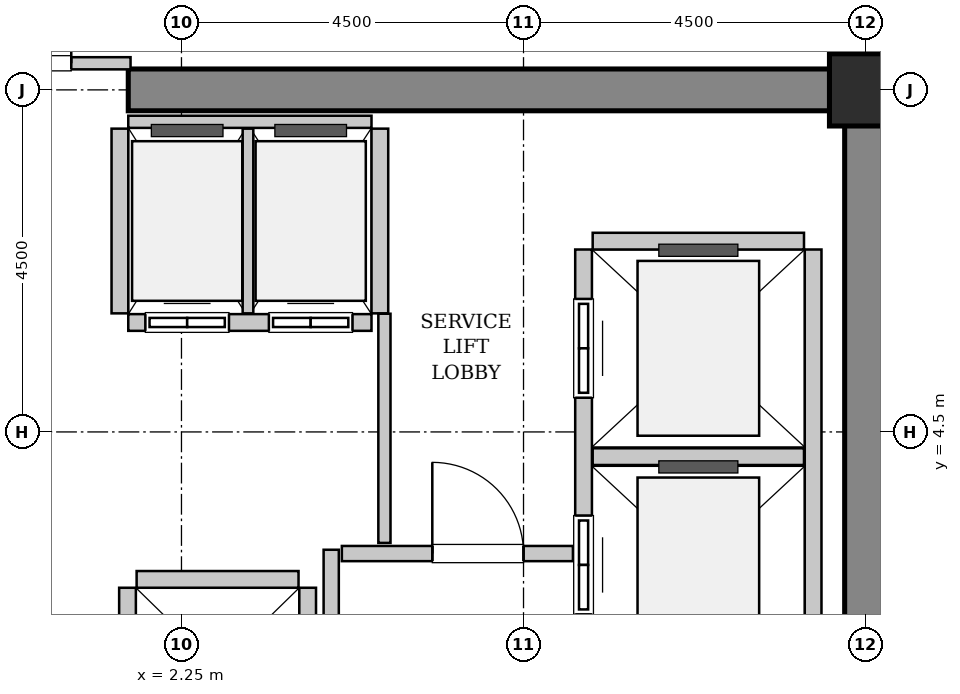
"""IFC4 building model, lengths in metres.
Left out: names, types, materials, properties, quantities, classifications, styles, units other than length and angle.
Written with IfcOpenShell. Run it as: python <this file> out.ifc"""

import sys

from ifc_helpers import new_model, si_unit, direction, frame, frame_2d, origin, origin_2d, place, context, subcontext, project, spatial, rectangle, hollow_rectangle, extrude, source, transform, mapped, element, fill, save


model = new_model("IFC4")
c1 = context("Model", 3, precision=1e-05, world=origin(), true_north=direction((0.0, 1.0)))
c2 = subcontext(c1, "Body", "Model", "MODEL_VIEW")
j1 = project(units=[si_unit("LENGTHUNIT", "METRE"), si_unit("PLANEANGLEUNIT", "RADIAN")], contexts=[c1])
p1 = place(None, origin())
s1 = spatial("IfcSite", under=j1, at=p1, CompositionType="ELEMENT")
p2 = place(p1, origin())
s2 = spatial("IfcBuilding", under=s1, at=p2, CompositionType="ELEMENT")
p3 = place(p2, frame((0.0, 0.0, 94.6)))
s3 = spatial("IfcBuildingStorey", under=s2, at=p3, CompositionType="ELEMENT", Elevation=94.6)
m1 = source(origin(), c2, "Body", "SweptSolid", [
    extrude(rectangle(XDim=9.975, YDim=0.55, at=frame_2d((4.987, 0.0))), origin(), (0.0, 0.0, 1.0), 3.8),
])
p4 = place(p3, frame((1.55, 9.0, 0.0), z_axis=(0.0, 0.0, 1.0), x_axis=(1.0, 0.0, 0.0)))
e1 = element("IfcWall", 1, at=p4, inside=s3, PredefinedType="SHEAR", context=c2, shape_type="MappedRepresentation", body=[
    mapped(m1, transform((0.0, 0.0, 0.0), x_axis=(1.0, 0.0, 0.0), y_axis=(0.0, 1.0, 0.0), z_axis=(0.0, 0.0, 1.0), scale=1.0)),
])
m2 = source(origin(), c2, "Body", "SweptSolid", [
    extrude(rectangle(XDim=7.375, YDim=0.55, at=frame_2d((3.688, 0.0))), origin(), (0.0, 0.0, 1.0), 3.8),
])
p5 = place(p3, frame((11.25, 1.35, 0.0), z_axis=(0.0, 0.0, 1.0), x_axis=(0.0, 1.0, 0.0)))
e2 = element("IfcWall", 2, at=p5, inside=s3, PredefinedType="SHEAR", context=c2, shape_type="MappedRepresentation", body=[
    mapped(m2, transform((0.0, 0.0, 0.0), x_axis=(1.0, 0.0, 0.0), y_axis=(0.0, 1.0, 0.0), z_axis=(0.0, 0.0, 1.0), scale=1.0)),
])
m3 = source(origin(), c2, "Body", "SweptSolid", [
    extrude(hollow_rectangle(XDim=0.95, YDim=0.95, WallThickness=0.045, InnerFilletRadius=0.045, OuterFilletRadius=0.09, at=origin_2d()), origin(), (0.0, 0.0, 1.0), 3.8),
])
p6 = place(p3, frame((11.25, 9.0, 0.0), z_axis=(0.0, 0.0, 1.0), x_axis=(1.0, 0.0, 0.0)))
e3 = element("IfcColumn", 3, at=p6, inside=s3, PredefinedType="COLUMN", context=c2, shape_type="MappedRepresentation", body=[
    mapped(m3, transform((0.0, 0.0, 0.0), x_axis=(1.0, 0.0, 0.0), y_axis=(0.0, 1.0, 0.0), z_axis=(0.0, 0.0, 1.0), scale=1.0)),
])
m4 = source(origin(), c2, "Body", "SweptSolid", [
    extrude(rectangle(XDim=5.45, YDim=0.22, at=frame_2d((2.725, 0.0))), origin(), (0.0, 0.0, 1.0), 3.535),
])
p7 = place(p3, frame((7.54, 6.9, 0.0), z_axis=(0.0, 0.0, 1.0), x_axis=(0.0, -1.0, 0.0)))
e4 = element("IfcWall", 4, at=p7, inside=s3, PredefinedType="SOLIDWALL", context=c2, shape_type="MappedRepresentation", body=[
    mapped(m4, transform((0.0, 0.0, 0.0), x_axis=(1.0, 0.0, 0.0), y_axis=(0.0, 1.0, 0.0), z_axis=(0.0, 0.0, 1.0), scale=1.0)),
])
p8 = place(p7, frame((3.5, 0.0, 0.0)))
e5 = element("IfcOpeningElement", 5, at=p8, cuts=e4, PredefinedType="OPENING", context=c2, shape_type="SweptSolid", body=[
    extrude(rectangle(XDim=1.3, YDim=2.3, at=frame_2d((0.65, 1.15))), frame((0.0, 0.12, 0.0), z_axis=(0.0, -1.0, 0.0), x_axis=(1.0, 0.0, 0.0)), (0.0, 0.0, 1.0), 0.24),
])
p9 = place(p7, frame((0.65, 0.0, 0.0)))
e6 = element("IfcOpeningElement", 6, at=p9, cuts=e4, PredefinedType="OPENING", context=c2, shape_type="SweptSolid", body=[
    extrude(rectangle(XDim=1.3, YDim=2.3, at=frame_2d((0.65, 1.15))), frame((0.0, 0.12, 0.0), z_axis=(0.0, -1.0, 0.0), x_axis=(1.0, 0.0, 0.0)), (0.0, 0.0, 1.0), 0.24),
])
p10 = place(p3, frame((10.56, 1.45, 0.0), z_axis=(0.0, 0.0, 1.0), x_axis=(0.0, 1.0, 0.0)))
e7 = element("IfcWall", 7, at=p10, inside=s3, PredefinedType="SOLIDWALL", context=c2, shape_type="MappedRepresentation", body=[
    mapped(m4, transform((0.0, 0.0, 0.0), x_axis=(1.0, 0.0, 0.0), y_axis=(0.0, 1.0, 0.0), z_axis=(0.0, 0.0, 1.0), scale=1.0)),
])
m5 = source(origin(), c2, "Body", "SweptSolid", [
    extrude(rectangle(XDim=2.78, YDim=0.22, at=frame_2d((1.39, 0.0))), origin(), (0.0, 0.0, 1.0), 3.535),
])
for number, where, z_axis, x_axis in (
    (8, (7.66, 4.175, 0.0), (0.0, 0.0, 1.0), (1.0, 0.0, 0.0)),
    (9, (10.44, 7.01, 0.0), (0.0, 0.0, 1.0), (-1.0, 0.0, 0.0)),
):
    element("IfcWall", number, at=place(p3, frame(where, z_axis=z_axis, x_axis=x_axis)), inside=s3, PredefinedType="SOLIDWALL", context=c2, shape_type="MappedRepresentation", body=[
        mapped(m5, transform((0.0, 0.0, 0.0), x_axis=(1.0, 0.0, 0.0), y_axis=(0.0, 1.0, 0.0), z_axis=(0.0, 0.0, 1.0), scale=1.0)),
    ])
m6 = source(origin(), c2, "Body", "SweptSolid", [
    extrude(rectangle(XDim=3.2, YDim=0.22, at=frame_2d((1.6, 0.0))), origin(), (0.0, 0.0, 1.0), 3.535),
])
p11 = place(p3, frame((1.55, 5.94, 0.0), z_axis=(0.0, 0.0, 1.0), x_axis=(1.0, 0.0, 0.0)))
e10 = element("IfcWall", 10, at=p11, inside=s3, PredefinedType="SOLIDWALL", context=c2, shape_type="MappedRepresentation", body=[
    mapped(m6, transform((0.0, 0.0, 0.0), x_axis=(1.0, 0.0, 0.0), y_axis=(0.0, 1.0, 0.0), z_axis=(0.0, 0.0, 1.0), scale=1.0)),
])
p12 = place(p11, frame((0.225, 0.0, 0.0)))
e11 = element("IfcOpeningElement", 11, at=p12, cuts=e10, PredefinedType="OPENING", context=c2, shape_type="SweptSolid", body=[
    extrude(rectangle(XDim=1.1, YDim=2.2, at=frame_2d((0.55, 1.1))), frame((0.0, 0.12, 0.0), z_axis=(0.0, -1.0, 0.0), x_axis=(1.0, 0.0, 0.0)), (0.0, 0.0, 1.0), 0.24),
])
p13 = place(p11, frame((1.85, 0.0, 0.0)))
e12 = element("IfcOpeningElement", 12, at=p13, cuts=e10, PredefinedType="OPENING", context=c2, shape_type="SweptSolid", body=[
    extrude(rectangle(XDim=1.1, YDim=2.2, at=frame_2d((0.55, 1.1))), frame((0.0, 0.12, 0.0), z_axis=(0.0, -1.0, 0.0), x_axis=(1.0, 0.0, 0.0)), (0.0, 0.0, 1.0), 0.24),
])
m7 = source(origin(), c2, "Body", "SweptSolid", [
    extrude(rectangle(XDim=3.2, YDim=0.16, at=frame_2d((1.6, 0.0))), origin(), (0.0, 0.0, 1.0), 2.425),
])
p14 = place(p3, frame((4.75, 8.58, 0.0), z_axis=(0.0, 0.0, 1.0), x_axis=(-1.0, 0.0, 0.0)))
e13 = element("IfcWall", 13, at=p14, inside=s3, PredefinedType="PARTITIONING", context=c2, shape_type="MappedRepresentation", body=[
    mapped(m7, transform((0.0, 0.0, 0.0), x_axis=(1.0, 0.0, 0.0), y_axis=(0.0, 1.0, 0.0), z_axis=(0.0, 0.0, 1.0), scale=1.0)),
])
m8 = source(origin(), c2, "Body", "SweptSolid", [
    extrude(rectangle(XDim=2.43, YDim=0.22, at=frame_2d((1.215, 0.0))), origin(), (0.0, 0.0, 1.0), 3.535),
])
p15 = place(p3, frame((1.44, 8.49, 0.0), z_axis=(0.0, 0.0, 1.0), x_axis=(0.0, -1.0, 0.0)))
e14 = element("IfcWall", 14, at=p15, inside=s3, PredefinedType="SOLIDWALL", context=c2, shape_type="MappedRepresentation", body=[
    mapped(m8, transform((0.0, 0.0, 0.0), x_axis=(1.0, 0.0, 0.0), y_axis=(0.0, 1.0, 0.0), z_axis=(0.0, 0.0, 1.0), scale=1.0)),
])
m9 = source(origin(), c2, "Body", "SweptSolid", [
    extrude(rectangle(XDim=2.43, YDim=0.14, at=frame_2d((1.215, 0.0))), origin(), (0.0, 0.0, 1.0), 3.535),
])
p16 = place(p3, frame((3.125, 6.06, 0.0), z_axis=(0.0, 0.0, 1.0), x_axis=(0.0, 1.0, 0.0)))
e15 = element("IfcWall", 15, at=p16, inside=s3, PredefinedType="PARTITIONING", context=c2, shape_type="MappedRepresentation", body=[
    mapped(m9, transform((0.0, 0.0, 0.0), x_axis=(1.0, 0.0, 0.0), y_axis=(0.0, 1.0, 0.0), z_axis=(0.0, 0.0, 1.0), scale=1.0)),
])
p17 = place(p3, frame((4.86, 6.06, 0.0), z_axis=(0.0, 0.0, 1.0), x_axis=(0.0, 1.0, 0.0)))
e16 = element("IfcWall", 16, at=p17, inside=s3, PredefinedType="SOLIDWALL", context=c2, shape_type="MappedRepresentation", body=[
    mapped(m8, transform((0.0, 0.0, 0.0), x_axis=(1.0, 0.0, 0.0), y_axis=(0.0, 1.0, 0.0), z_axis=(0.0, 0.0, 1.0), scale=1.0)),
])
m10 = source(origin(), c2, "Body", "SweptSolid", [
    extrude(rectangle(XDim=4.9, YDim=0.22, at=frame_2d((2.45, 0.0))), origin(), (0.0, 0.0, 1.0), 3.535),
])
for number, where, z_axis, x_axis in (
    (17, (1.54, 2.45, 0.0), (0.0, 0.0, 1.0), (0.0, -1.0, 0.0)),
    (18, (3.91, -2.45, 0.0), (0.0, 0.0, 1.0), (0.0, 1.0, 0.0)),
):
    element("IfcWall", number, at=place(p3, frame(where, z_axis=z_axis, x_axis=x_axis)), inside=s3, PredefinedType="SOLIDWALL", context=c2, shape_type="MappedRepresentation", body=[
        mapped(m10, transform((0.0, 0.0, 0.0), x_axis=(1.0, 0.0, 0.0), y_axis=(0.0, 1.0, 0.0), z_axis=(0.0, 0.0, 1.0), scale=1.0)),
    ])
m11 = source(origin(), c2, "Body", "SweptSolid", [
    extrude(rectangle(XDim=2.13, YDim=0.22, at=frame_2d((1.065, 0.0))), origin(), (0.0, 0.0, 1.0), 3.535),
])
p18 = place(p3, frame((3.79, 2.56, 0.0), z_axis=(0.0, 0.0, 1.0), x_axis=(-1.0, 0.0, 0.0)))
e19 = element("IfcWall", 19, at=p18, inside=s3, PredefinedType="SOLIDWALL", context=c2, shape_type="MappedRepresentation", body=[
    mapped(m11, transform((0.0, 0.0, 0.0), x_axis=(1.0, 0.0, 0.0), y_axis=(0.0, 1.0, 0.0), z_axis=(0.0, 0.0, 1.0), scale=1.0)),
])
m12 = source(origin(), c2, "Body", "SweptSolid", [
    extrude(rectangle(XDim=5.9, YDim=0.2, at=frame_2d((2.95, 0.0))), origin(), (0.0, 0.0, 1.0), 3.535),
])
p19 = place(p3, frame((4.22, -2.95, 0.0), z_axis=(0.0, 0.0, 1.0), x_axis=(0.0, 1.0, 0.0)))
e20 = element("IfcWall", 20, at=p19, inside=s3, PredefinedType="PARTITIONING", context=c2, shape_type="MappedRepresentation", body=[
    mapped(m12, transform((0.0, 0.0, 0.0), x_axis=(1.0, 0.0, 0.0), y_axis=(0.0, 1.0, 0.0), z_axis=(0.0, 0.0, 1.0), scale=1.0)),
])
m13 = source(origin(), c2, "Body", "SweptSolid", [
    extrude(rectangle(XDim=3.04, YDim=0.2, at=frame_2d((1.52, 0.0))), origin(), (0.0, 0.0, 1.0), 3.535),
])
p20 = place(p3, frame((4.36, 2.9, 0.0), z_axis=(0.0, 0.0, 1.0), x_axis=(1.0, 0.0, 0.0)))
e21 = element("IfcWall", 21, at=p20, inside=s3, PredefinedType="PARTITIONING", context=c2, shape_type="MappedRepresentation", body=[
    mapped(m13, transform((0.0, 0.0, 0.0), x_axis=(1.0, 0.0, 0.0), y_axis=(0.0, 1.0, 0.0), z_axis=(0.0, 0.0, 1.0), scale=1.0)),
])
p21 = place(p20, frame((1.19, 0.0, 0.0)))
e22 = element("IfcOpeningElement", 22, at=p21, cuts=e21, PredefinedType="OPENING", context=c2, shape_type="SweptSolid", body=[
    extrude(rectangle(XDim=1.2, YDim=2.15, at=frame_2d((0.6, 1.075))), frame((0.0, 0.11, 0.0), z_axis=(0.0, -1.0, 0.0), x_axis=(1.0, 0.0, 0.0)), (0.0, 0.0, 1.0), 0.22),
])
m14 = source(origin(), c2, "Body", "SweptSolid", [
    extrude(rectangle(XDim=3.16, YDim=0.16, at=frame_2d((1.58, 0.0))), origin(), (0.0, 0.0, 1.0), 2.425),
])
p22 = place(p3, frame((-1.58, 9.35, 0.0), z_axis=(0.0, 0.0, 1.0), x_axis=(1.0, 0.0, 0.0)))
e23 = element("IfcWall", 23, at=p22, inside=s3, PredefinedType="PARTITIONING", context=c2, shape_type="MappedRepresentation", body=[
    mapped(m14, transform((0.0, 0.0, 0.0), x_axis=(1.0, 0.0, 0.0), y_axis=(0.0, 1.0, 0.0), z_axis=(0.0, 0.0, 1.0), scale=1.0)),
])
p23 = place(p22, frame((0.78, 0.0, 0.0)))
e24 = element("IfcOpeningElement", 24, at=p23, cuts=e23, PredefinedType="OPENING", context=c2, shape_type="SweptSolid", body=[
    extrude(rectangle(XDim=1.6, YDim=2.3, at=frame_2d((0.8, 1.15))), frame((0.0, 0.09, 0.0), z_axis=(0.0, -1.0, 0.0), x_axis=(1.0, 0.0, 0.0)), (0.0, 0.0, 1.0), 0.18),
])
m15 = source(origin(), c2, "Body", "SweptSolid", [
    extrude(rectangle(XDim=3.015, YDim=0.16, at=frame_2d((1.507, 0.0))), origin(), (0.0, 0.0, 1.0), 3.535),
])
p24 = place(p3, frame((4.92, 3.04, 0.0), z_axis=(0.0, 0.0, 1.0), x_axis=(0.0, 1.0, 0.0)))
e25 = element("IfcWall", 25, at=p24, inside=s3, PredefinedType="PARTITIONING", context=c2, shape_type="MappedRepresentation", body=[
    mapped(m15, transform((0.0, 0.0, 0.0), x_axis=(1.0, 0.0, 0.0), y_axis=(0.0, 1.0, 0.0), z_axis=(0.0, 0.0, 1.0), scale=1.0)),
])
m16 = source(origin(), c2, "Body", "SweptSolid", [
    extrude(rectangle(XDim=1.3, YDim=2.3, at=frame_2d((0.65, 1.15))), frame((0.0, 0.025, 0.0), z_axis=(0.0, -1.0, 0.0), x_axis=(1.0, 0.0, 0.0)), (0.0, 0.0, 1.0), 0.05),
])
p25 = place(p8, origin())
e26 = element("IfcDoor", 26, at=p25, inside=s3, OperationType="SLIDING_TO_RIGHT", PredefinedType="DOOR", context=c2, shape_type="MappedRepresentation", body=[
    mapped(m16, transform((0.0, 0.0, 0.0), x_axis=(1.0, 0.0, 0.0), y_axis=(0.0, 1.0, 0.0), z_axis=(0.0, 0.0, 1.0), scale=1.0)),
])
fill(e5, e26)
p26 = place(p9, origin())
e27 = element("IfcDoor", 27, at=p26, inside=s3, OperationType="SLIDING_TO_RIGHT", PredefinedType="DOOR", context=c2, shape_type="MappedRepresentation", body=[
    mapped(m16, transform((0.0, 0.0, 0.0), x_axis=(1.0, 0.0, 0.0), y_axis=(0.0, 1.0, 0.0), z_axis=(0.0, 0.0, 1.0), scale=1.0)),
])
fill(e6, e27)
m17 = source(origin(), c2, "Body", "SweptSolid", [
    extrude(rectangle(XDim=1.1, YDim=2.2, at=frame_2d((0.55, 1.1))), frame((0.0, 0.025, 0.0), z_axis=(0.0, -1.0, 0.0), x_axis=(1.0, 0.0, 0.0)), (0.0, 0.0, 1.0), 0.05),
])
p27 = place(p12, origin())
e28 = element("IfcDoor", 28, at=p27, inside=s3, OperationType="DOUBLE_DOOR_SLIDING", PredefinedType="DOOR", context=c2, shape_type="MappedRepresentation", body=[
    mapped(m17, transform((0.0, 0.0, 0.0), x_axis=(1.0, 0.0, 0.0), y_axis=(0.0, 1.0, 0.0), z_axis=(0.0, 0.0, 1.0), scale=1.0)),
])
fill(e11, e28)
p28 = place(p13, origin())
e29 = element("IfcDoor", 29, at=p28, inside=s3, OperationType="DOUBLE_DOOR_SLIDING", PredefinedType="DOOR", context=c2, shape_type="MappedRepresentation", body=[
    mapped(m17, transform((0.0, 0.0, 0.0), x_axis=(1.0, 0.0, 0.0), y_axis=(0.0, 1.0, 0.0), z_axis=(0.0, 0.0, 1.0), scale=1.0)),
])
fill(e12, e29)
m18 = source(origin(), c2, "Body", "SweptSolid", [
    extrude(rectangle(XDim=1.2, YDim=2.15, at=frame_2d((0.6, 1.075))), frame((0.0, 0.025, 0.0), z_axis=(0.0, -1.0, 0.0), x_axis=(1.0, 0.0, 0.0)), (0.0, 0.0, 1.0), 0.05),
])
p29 = place(p21, origin())
e30 = element("IfcDoor", 30, at=p29, inside=s3, OperationType="SINGLE_SWING_LEFT", PredefinedType="DOOR", context=c2, shape_type="MappedRepresentation", body=[
    mapped(m18, transform((0.0, 0.0, 0.0), x_axis=(1.0, 0.0, 0.0), y_axis=(0.0, 1.0, 0.0), z_axis=(0.0, 0.0, 1.0), scale=1.0)),
])
fill(e22, e30)
m19 = source(origin(), c2, "Body", "SweptSolid", [
    extrude(rectangle(XDim=1.6, YDim=2.3, at=frame_2d((0.8, 1.15))), frame((0.0, 0.025, 0.0), z_axis=(0.0, -1.0, 0.0), x_axis=(1.0, 0.0, 0.0)), (0.0, 0.0, 1.0), 0.05),
])
p30 = place(p23, origin())
e31 = element("IfcDoor", 31, at=p30, inside=s3, OperationType="DOUBLE_DOOR_SINGLE_SWING", PredefinedType="DOOR", context=c2, shape_type="MappedRepresentation", body=[
    mapped(m19, transform((0.0, 0.0, 0.0), x_axis=(1.0, 0.0, 0.0), y_axis=(0.0, 1.0, 0.0), z_axis=(0.0, 0.0, 1.0), scale=1.0)),
])
fill(e24, e31)
save(model, sys.argv[1])
